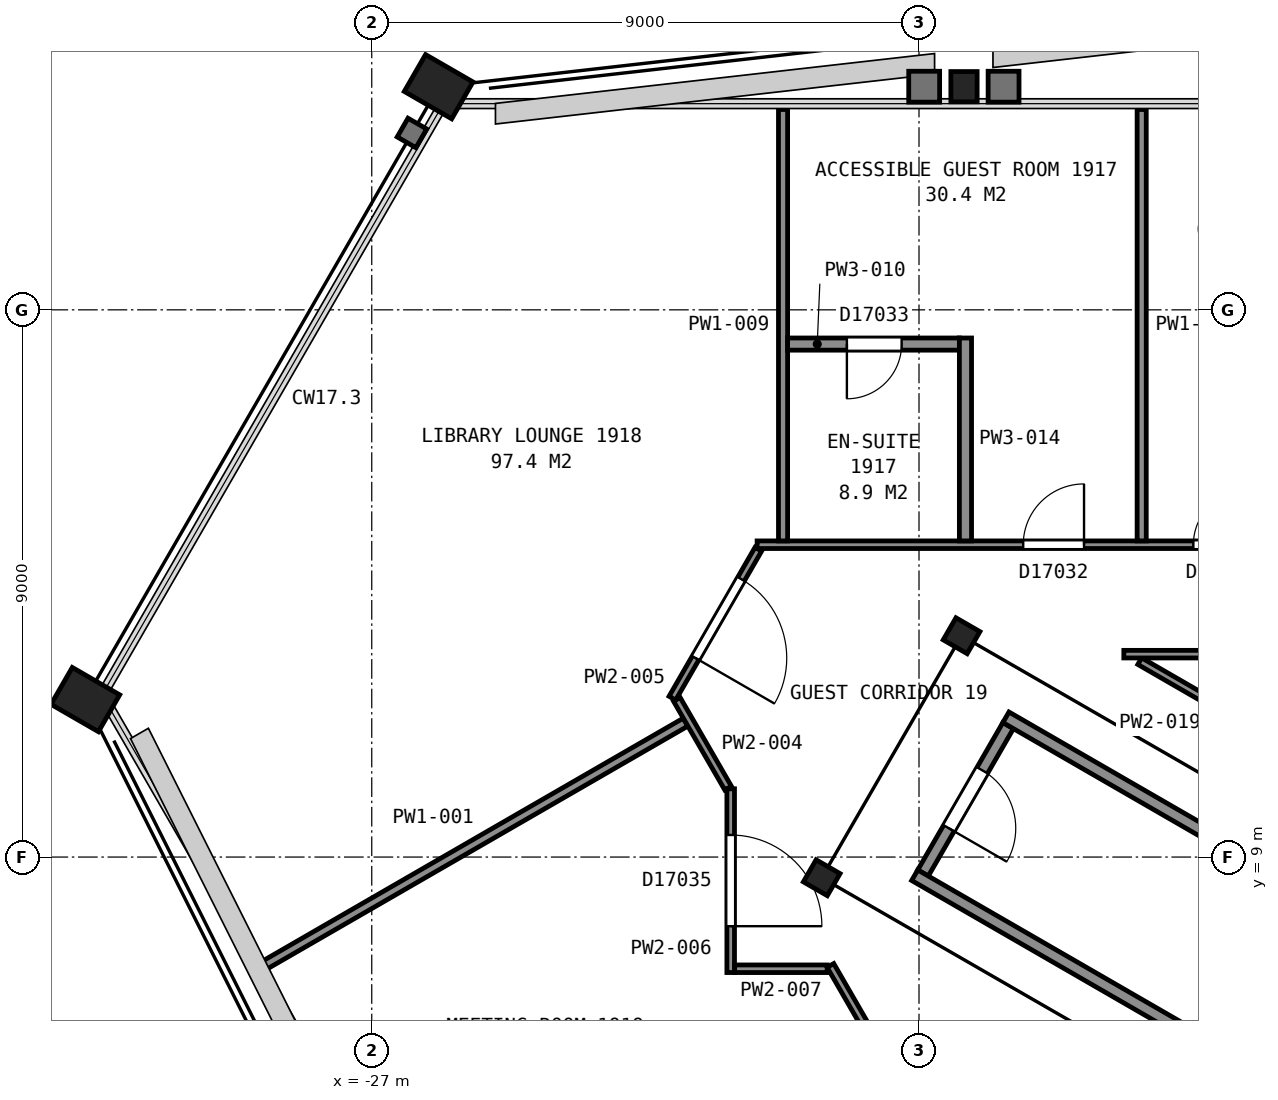
"""IFC4 building model, lengths in metres.
Left out: names, types, materials, properties, quantities, classifications, styles, units other than length and angle.
Written with IfcOpenShell. Run it as: python <this file> out.ifc"""

import sys

from ifc_helpers import new_model, si_unit, direction, frame, frame_2d, origin, origin_2d, place, context, subcontext, project, spatial, rectangle, hollow_rectangle, i_section, extrude, element, fill, save


model = new_model("IFC4")
c1 = context("Model", 3, precision=1e-05, world=origin(), true_north=direction((0.0, 1.0)))
c2 = subcontext(c1, "Body", "Model", "MODEL_VIEW")
j1 = project(units=[si_unit("LENGTHUNIT", "METRE"), si_unit("PLANEANGLEUNIT", "RADIAN")], contexts=[c1])
p1 = place(None, origin())
s1 = spatial("IfcSite", under=j1, at=p1, CompositionType="ELEMENT")
p2 = place(p1, origin())
s2 = spatial("IfcBuilding", under=s1, at=p2, CompositionType="ELEMENT")
p3 = place(p2, frame((0.0, 0.0, 83.6)))
s3 = spatial("IfcBuildingStorey", under=s2, at=p3, CompositionType="ELEMENT", Elevation=83.6)
p4 = place(p3, frame((-17.26, 21.67, 0.0), z_axis=(0.0, 0.0, 1.0), x_axis=(1.0, 0.0, 0.0)))
e1 = element("IfcColumn", 1, at=p4, inside=s3, PredefinedType="COLUMN", context=c2, shape_type="SweptSolid", body=[
    extrude(i_section(OverallWidth=0.432, OverallDepth=0.498, WebThickness=0.056, FlangeThickness=0.089, FilletRadius=0.015, at=origin_2d()), origin(), (0.0, 0.0, 1.0), 2.87),
])
for number, where, z_axis, x_axis in (
    (2, (-25.9, 21.67, 0.0), (0.0, 0.0, 1.0), (0.5, 0.866, 0.0)),
    (3, (-31.71, 11.59, 0.0), (0.0, 0.0, 1.0), (0.5, 0.866, 0.0)),
):
    element("IfcColumn", number, at=place(p3, frame(where, z_axis=z_axis, x_axis=x_axis)), inside=s3, PredefinedType="COLUMN", context=c2, shape_type="SweptSolid", body=[
        extrude(hollow_rectangle(XDim=0.7, YDim=0.9, WallThickness=0.065, at=origin_2d()), origin(), (0.0, 0.0, 1.0), 3.6),
    ])
for number, where, z_axis, x_axis in (
    (4, (-17.3, 12.64, 0.0), (0.0, 0.0, 1.0), (0.5, 0.866, 0.0)),
    (5, (-19.6, 8.66, 0.0), (0.0, 0.0, 1.0), (0.5, 0.866, 0.0)),
):
    element("IfcColumn", number, at=place(p3, frame(where, z_axis=z_axis, x_axis=x_axis)), inside=s3, PredefinedType="COLUMN", context=c2, shape_type="SweptSolid", body=[
        extrude(i_section(OverallWidth=0.419, OverallDepth=0.455, WebThickness=0.042, FlangeThickness=0.068, FilletRadius=0.015, at=origin_2d()), origin(), (0.0, 0.0, 1.0), 3.6),
    ])
p5 = place(p3, frame((-16.534, 11.162, 0.0), z_axis=(0.0, 0.0, 1.0), x_axis=(-0.49998411664, -0.866034573852, 0.0)))
e6 = element("IfcWall", 6, at=p5, inside=s3, PredefinedType="PARTITIONING", context=c2, shape_type="SweptSolid", body=[
    extrude(rectangle(XDim=2.8, YDim=0.2, at=frame_2d((1.4, 0.0))), origin(), (0.0, 0.0, 1.0), 3.35),
])
p6 = place(p5, frame((0.85, 0.0, 0.0)))
e7 = element("IfcOpeningElement", 7, at=p6, cuts=e6, PredefinedType="OPENING", context=c2, shape_type="SweptSolid", body=[
    extrude(rectangle(XDim=1.1, YDim=2.1, at=frame_2d((0.55, 1.05))), frame((0.0, 0.11, 0.0), z_axis=(0.0, -1.0, 0.0), x_axis=(1.0, 0.0, 0.0)), (0.0, 0.0, 1.0), 0.22),
])
for number, where, z_axis, x_axis in (
    (8, (-7.678, 2.701, 0.0), (0.0, 0.0, 1.0), (-0.866, 0.5, 0.0)),
    (9, (-6.178, 5.299, 0.0), (0.0, 0.0, 1.0), (-0.866, 0.5, 0.0)),
):
    element("IfcWall", number, at=place(p3, frame(where, z_axis=z_axis, x_axis=x_axis)), inside=s3, PredefinedType="PARTITIONING", context=c2, shape_type="SweptSolid", body=[
        extrude(rectangle(XDim=12.0, YDim=0.2, at=frame_2d((6.0, 0.0))), origin(), (0.0, 0.0, 1.0), 3.35),
    ])
p7 = place(p3, frame((-28.76, 7.223, 0.0), z_axis=(0.0, 0.0, 1.0), x_axis=(0.866019724796, 0.500009836168, 0.0)))
e10 = element("IfcWall", 10, at=p7, inside=s3, PredefinedType="PARTITIONING", context=c2, shape_type="SweptSolid", body=[
    extrude(rectangle(XDim=7.991, YDim=0.15, at=frame_2d((3.996, 0.0))), origin(), (0.0, 0.0, 1.0), 2.262),
])
p8 = place(p3, frame((-21.982, 11.594, 0.0), z_axis=(0.0, 0.0, 1.0), x_axis=(0.500048373822, -0.865997473344, 0.0)))
e11 = element("IfcWall", 11, at=p8, inside=s3, PredefinedType="PARTITIONING", context=c2, shape_type="SweptSolid", body=[
    extrude(rectangle(XDim=1.686, YDim=0.125, at=frame_2d((0.843, 0.0))), origin(), (0.0, 0.0, 1.0), 2.262),
])
p9 = place(p3, frame((-22.056, 11.613, 0.0), z_axis=(0.0, 0.0, 1.0), x_axis=(0.499647745683, 0.866228682412, 0.0)))
e12 = element("IfcWall", 12, at=p9, inside=s3, PredefinedType="PARTITIONING", context=c2, shape_type="SweptSolid", body=[
    extrude(rectangle(XDim=2.829, YDim=0.125, at=frame_2d((1.415, 0.0))), origin(), (0.0, 0.0, 1.0), 2.262),
])
p10 = place(p9, frame((0.762, 0.0, 0.0)))
e13 = element("IfcOpeningElement", 13, at=p10, cuts=e12, PredefinedType="OPENING", context=c2, shape_type="SweptSolid", body=[
    extrude(rectangle(XDim=1.5, YDim=2.1, at=frame_2d((0.75, 1.05))), frame((0.0, 0.073, 0.0), z_axis=(0.0, -1.0, 0.0), x_axis=(1.0, 0.0, 0.0)), (0.0, 0.0, 1.0), 0.145),
])
p11 = place(p3, frame((-21.097, 7.101, 0.0), z_axis=(0.0, 0.0, 1.0), x_axis=(0.0, 1.0, 0.0)))
e14 = element("IfcWall", 14, at=p11, inside=s3, PredefinedType="PARTITIONING", context=c2, shape_type="SweptSolid", body=[
    extrude(rectangle(XDim=3.022, YDim=0.125, at=frame_2d((1.511, 0.0))), origin(), (0.0, 0.0, 1.0), 2.262),
])
p12 = place(p11, frame((0.762, 0.0, 0.0)))
e15 = element("IfcOpeningElement", 15, at=p12, cuts=e14, PredefinedType="OPENING", context=c2, shape_type="SweptSolid", body=[
    extrude(rectangle(XDim=1.5, YDim=2.1, at=frame_2d((0.75, 1.05))), frame((0.0, 0.073, 0.0), z_axis=(0.0, -1.0, 0.0), x_axis=(1.0, 0.0, 0.0)), (0.0, 0.0, 1.0), 0.145),
])
p13 = place(p3, frame((-21.032, 7.163, 0.0), z_axis=(0.0, 0.0, 1.0), x_axis=(1.0, 0.0, 0.0)))
e16 = element("IfcWall", 16, at=p13, inside=s3, PredefinedType="PARTITIONING", context=c2, shape_type="SweptSolid", body=[
    extrude(rectangle(XDim=1.522, YDim=0.125, at=frame_2d((0.761, 0.0))), origin(), (0.0, 0.0, 1.0), 2.262),
])
p14 = place(p3, frame((-20.663, 14.137, 0.0), z_axis=(0.0, 0.0, 1.0), x_axis=(1.0, 0.0, 0.0)))
e17 = element("IfcWall", 17, at=p14, inside=s3, PredefinedType="PARTITIONING", context=c2, shape_type="SweptSolid", body=[
    extrude(rectangle(XDim=41.325, YDim=0.125, at=frame_2d((20.663, 0.0))), origin(), (0.0, 0.0, 1.0), 2.262),
])
p15 = place(p14, frame((37.071, 0.0, 0.0)))
e18 = element("IfcOpeningElement", 18, at=p15, cuts=e17, PredefinedType="OPENING", context=c2, shape_type="SweptSolid", body=[
    extrude(rectangle(XDim=0.9, YDim=2.1, at=frame_2d((0.45, 1.05))), frame((0.0, 0.073, 0.0), z_axis=(0.0, -1.0, 0.0), x_axis=(1.0, 0.0, 0.0)), (0.0, 0.0, 1.0), 0.145),
])
p16 = place(p14, frame((34.272, 0.0, 0.0)))
e19 = element("IfcOpeningElement", 19, at=p16, cuts=e17, PredefinedType="OPENING", context=c2, shape_type="SweptSolid", body=[
    extrude(rectangle(XDim=1.0, YDim=2.1, at=frame_2d((0.5, 1.05))), frame((0.0, 0.073, 0.0), z_axis=(0.0, -1.0, 0.0), x_axis=(1.0, 0.0, 0.0)), (0.0, 0.0, 1.0), 0.145),
])
p17 = place(p14, frame((26.496, 0.0, 0.0)))
e20 = element("IfcOpeningElement", 20, at=p17, cuts=e17, PredefinedType="OPENING", context=c2, shape_type="SweptSolid", body=[
    extrude(rectangle(XDim=0.9, YDim=2.1, at=frame_2d((0.45, 1.05))), frame((0.0, 0.073, 0.0), z_axis=(0.0, -1.0, 0.0), x_axis=(1.0, 0.0, 0.0)), (0.0, 0.0, 1.0), 0.145),
])
p18 = place(p14, frame((23.917, 0.0, 0.0)))
e21 = element("IfcOpeningElement", 21, at=p18, cuts=e17, PredefinedType="OPENING", context=c2, shape_type="SweptSolid", body=[
    extrude(rectangle(XDim=0.9, YDim=2.1, at=frame_2d((0.45, 1.05))), frame((0.0, 0.073, 0.0), z_axis=(0.0, -1.0, 0.0), x_axis=(1.0, 0.0, 0.0)), (0.0, 0.0, 1.0), 0.145),
])
p19 = place(p14, frame((16.78, 0.0, 0.0)))
e22 = element("IfcOpeningElement", 22, at=p19, cuts=e17, PredefinedType="OPENING", context=c2, shape_type="SweptSolid", body=[
    extrude(rectangle(XDim=0.9, YDim=2.1, at=frame_2d((0.45, 1.05))), frame((0.0, 0.073, 0.0), z_axis=(0.0, -1.0, 0.0), x_axis=(1.0, 0.0, 0.0)), (0.0, 0.0, 1.0), 0.145),
])
p20 = place(p14, frame((13.952, 0.0, 0.0)))
e23 = element("IfcOpeningElement", 23, at=p20, cuts=e17, PredefinedType="OPENING", context=c2, shape_type="SweptSolid", body=[
    extrude(rectangle(XDim=0.9, YDim=2.1, at=frame_2d((0.45, 1.05))), frame((0.0, 0.073, 0.0), z_axis=(0.0, -1.0, 0.0), x_axis=(1.0, 0.0, 0.0)), (0.0, 0.0, 1.0), 0.145),
])
p21 = place(p14, frame((7.175, 0.0, 0.0)))
e24 = element("IfcOpeningElement", 24, at=p21, cuts=e17, PredefinedType="OPENING", context=c2, shape_type="SweptSolid", body=[
    extrude(rectangle(XDim=0.9, YDim=2.1, at=frame_2d((0.45, 1.05))), frame((0.0, 0.073, 0.0), z_axis=(0.0, -1.0, 0.0), x_axis=(1.0, 0.0, 0.0)), (0.0, 0.0, 1.0), 0.145),
])
p22 = place(p14, frame((4.376, 0.0, 0.0)))
e25 = element("IfcOpeningElement", 25, at=p22, cuts=e17, PredefinedType="OPENING", context=c2, shape_type="SweptSolid", body=[
    extrude(rectangle(XDim=1.0, YDim=2.1, at=frame_2d((0.5, 1.05))), frame((0.0, 0.073, 0.0), z_axis=(0.0, -1.0, 0.0), x_axis=(1.0, 0.0, 0.0)), (0.0, 0.0, 1.0), 0.145),
])
p23 = place(p3, frame((-20.236, 14.199, 0.0), z_axis=(0.0, 0.0, 1.0), x_axis=(0.0, 1.0, 0.0)))
e26 = element("IfcWall", 26, at=p23, inside=s3, PredefinedType="PARTITIONING", context=c2, shape_type="SweptSolid", body=[
    extrude(rectangle(XDim=7.095, YDim=0.15, at=frame_2d((3.548, 0.0))), origin(), (0.0, 0.0, 1.0), 2.262),
])
p24 = place(p3, frame((-17.336, 17.437, 0.0), z_axis=(0.0, 0.0, 1.0), x_axis=(-1.0, 0.0, 0.0)))
e27 = element("IfcWall", 27, at=p24, inside=s3, PredefinedType="PARTITIONING", context=c2, shape_type="SweptSolid", body=[
    extrude(rectangle(XDim=2.825, YDim=0.2, at=frame_2d((1.413, 0.0))), origin(), (0.0, 0.0, 1.0), 2.262),
])
p25 = place(p24, frame((0.95, 0.0, 0.0)))
e28 = element("IfcOpeningElement", 28, at=p25, cuts=e27, PredefinedType="OPENING", context=c2, shape_type="SweptSolid", body=[
    extrude(rectangle(XDim=0.9, YDim=2.1, at=frame_2d((0.45, 1.05))), frame((0.0, 0.11, 0.0), z_axis=(0.0, -1.0, 0.0), x_axis=(1.0, 0.0, 0.0)), (0.0, 0.0, 1.0), 0.22),
])
p26 = place(p3, frame((-3.766, -19.958, 0.0), z_axis=(0.0, 0.0, 1.0), x_axis=(-0.50002170027, 0.866012874765, 0.0)))
e29 = element("IfcWall", 29, at=p26, inside=s3, PredefinedType="PARTITIONING", context=c2, shape_type="SweptSolid", body=[
    extrude(rectangle(XDim=31.379, YDim=0.125, at=frame_2d((15.69, 0.0))), origin(), (0.0, 0.0, 1.0), 2.262),
])
p27 = place(p26, frame((25.28, 0.0, 0.0)))
e30 = element("IfcOpeningElement", 30, at=p27, cuts=e29, PredefinedType="OPENING", context=c2, shape_type="SweptSolid", body=[
    extrude(rectangle(XDim=1.5, YDim=2.1, at=frame_2d((0.75, 1.05))), frame((0.0, 0.073, 0.0), z_axis=(0.0, -1.0, 0.0), x_axis=(1.0, 0.0, 0.0)), (0.0, 0.0, 1.0), 0.145),
])
p28 = place(p26, frame((21.124, 0.0, 0.0)))
e31 = element("IfcOpeningElement", 31, at=p28, cuts=e29, PredefinedType="OPENING", context=c2, shape_type="SweptSolid", body=[
    extrude(rectangle(XDim=0.9, YDim=2.1, at=frame_2d((0.45, 1.05))), frame((0.0, 0.073, 0.0), z_axis=(0.0, -1.0, 0.0), x_axis=(1.0, 0.0, 0.0)), (0.0, 0.0, 1.0), 0.145),
])
p29 = place(p26, frame((14.349, 0.0, 0.0)))
e32 = element("IfcOpeningElement", 32, at=p29, cuts=e29, PredefinedType="OPENING", context=c2, shape_type="SweptSolid", body=[
    extrude(rectangle(XDim=0.9, YDim=2.1, at=frame_2d((0.45, 1.05))), frame((0.0, 0.073, 0.0), z_axis=(0.0, -1.0, 0.0), x_axis=(1.0, 0.0, 0.0)), (0.0, 0.0, 1.0), 0.145),
])
p30 = place(p26, frame((11.804, 0.0, 0.0)))
e33 = element("IfcOpeningElement", 33, at=p30, cuts=e29, PredefinedType="OPENING", context=c2, shape_type="SweptSolid", body=[
    extrude(rectangle(XDim=0.9, YDim=2.1, at=frame_2d((0.45, 1.05))), frame((0.0, 0.073, 0.0), z_axis=(0.0, -1.0, 0.0), x_axis=(1.0, 0.0, 0.0)), (0.0, 0.0, 1.0), 0.145),
])
p31 = place(p26, frame((5.33, 0.0, 0.0)))
e34 = element("IfcOpeningElement", 34, at=p31, cuts=e29, PredefinedType="OPENING", context=c2, shape_type="SweptSolid", body=[
    extrude(rectangle(XDim=0.9, YDim=2.1, at=frame_2d((0.45, 1.05))), frame((0.0, 0.073, 0.0), z_axis=(0.0, -1.0, 0.0), x_axis=(1.0, 0.0, 0.0)), (0.0, 0.0, 1.0), 0.145),
])
p32 = place(p26, frame((2.906, 0.0, 0.0)))
e35 = element("IfcOpeningElement", 35, at=p32, cuts=e29, PredefinedType="OPENING", context=c2, shape_type="SweptSolid", body=[
    extrude(rectangle(XDim=1.0, YDim=2.1, at=frame_2d((0.5, 1.05))), frame((0.0, 0.073, 0.0), z_axis=(0.0, -1.0, 0.0), x_axis=(1.0, 0.0, 0.0)), (0.0, 0.0, 1.0), 0.145),
])
p33 = place(p3, frame((-17.236, 14.199, 0.0), z_axis=(0.0, 0.0, 1.0), x_axis=(0.0, 1.0, 0.0)))
e36 = element("IfcWall", 36, at=p33, inside=s3, PredefinedType="PARTITIONING", context=c2, shape_type="SweptSolid", body=[
    extrude(rectangle(XDim=3.338, YDim=0.2, at=frame_2d((1.669, 0.0))), origin(), (0.0, 0.0, 1.0), 2.262),
])
p34 = place(p3, frame((-14.37, 12.222, 0.0), z_axis=(0.0, 0.0, 1.0), x_axis=(0.866063239147, -0.499934461503, 0.0)))
e37 = element("IfcWall", 37, at=p34, inside=s3, PredefinedType="PARTITIONING", context=c2, shape_type="SweptSolid", body=[
    extrude(rectangle(XDim=2.359, YDim=0.125, at=frame_2d((1.18, 0.0))), origin(), (0.0, 0.0, 1.0), 2.262),
])
p35 = place(p3, frame((-14.632, 12.337, 0.0), z_axis=(0.0, 0.0, 1.0), x_axis=(1.0, 0.0, 0.0)))
e38 = element("IfcWall", 38, at=p35, inside=s3, PredefinedType="PARTITIONING", context=c2, shape_type="SweptSolid", body=[
    extrude(rectangle(XDim=29.263, YDim=0.125, at=frame_2d((14.632, 0.0))), origin(), (0.0, 0.0, 1.0), 2.262),
])
p36 = place(p3, frame((-14.338, 14.199, 0.0), z_axis=(0.0, 0.0, 1.0), x_axis=(0.0, 1.0, 0.0)))
e39 = element("IfcWall", 39, at=p36, inside=s3, PredefinedType="PARTITIONING", context=c2, shape_type="SweptSolid", body=[
    extrude(rectangle(XDim=7.095, YDim=0.15, at=frame_2d((3.548, 0.0))), origin(), (0.0, 0.0, 1.0), 2.262),
])
p37 = place(p6, origin())
e40 = element("IfcDoor", 40, at=p37, inside=s3, OperationType="SINGLE_SWING_RIGHT", PredefinedType="DOOR", context=c2, shape_type="SweptSolid", body=[
    extrude(rectangle(XDim=1.1, YDim=2.1, at=frame_2d((0.55, 1.05))), frame((0.0, 0.025, 0.0), z_axis=(0.0, -1.0, 0.0), x_axis=(1.0, 0.0, 0.0)), (0.0, 0.0, 1.0), 0.05),
])
fill(e7, e40)
p38 = place(p10, origin())
e41 = element("IfcDoor", 41, at=p38, inside=s3, OperationType="DOUBLE_DOOR_SINGLE_SWING", PredefinedType="DOOR", context=c2, shape_type="SweptSolid", body=[
    extrude(rectangle(XDim=1.5, YDim=2.1, at=frame_2d((0.75, 1.05))), frame((0.0, 0.025, 0.0), z_axis=(0.0, -1.0, 0.0), x_axis=(1.0, 0.0, 0.0)), (0.0, 0.0, 1.0), 0.05),
])
fill(e13, e41)
p39 = place(p12, origin())
e42 = element("IfcDoor", 42, at=p39, inside=s3, OperationType="DOUBLE_DOOR_SINGLE_SWING", PredefinedType="DOOR", context=c2, shape_type="SweptSolid", body=[
    extrude(rectangle(XDim=1.5, YDim=2.1, at=frame_2d((0.75, 1.05))), frame((0.0, 0.025, 0.0), z_axis=(0.0, -1.0, 0.0), x_axis=(1.0, 0.0, 0.0)), (0.0, 0.0, 1.0), 0.05),
])
fill(e15, e42)
p40 = place(p21, origin())
e43 = element("IfcDoor", 43, at=p40, inside=s3, OperationType="SINGLE_SWING_RIGHT", PredefinedType="DOOR", context=c2, shape_type="SweptSolid", body=[
    extrude(rectangle(XDim=0.9, YDim=2.1, at=frame_2d((0.45, 1.05))), frame((0.0, 0.025, 0.0), z_axis=(0.0, -1.0, 0.0), x_axis=(1.0, 0.0, 0.0)), (0.0, 0.0, 1.0), 0.05),
])
fill(e24, e43)
p41 = place(p22, origin())
e44 = element("IfcDoor", 44, at=p41, inside=s3, OperationType="SINGLE_SWING_RIGHT", PredefinedType="DOOR", context=c2, shape_type="SweptSolid", body=[
    extrude(rectangle(XDim=1.0, YDim=2.1, at=frame_2d((0.5, 1.05))), frame((0.0, 0.025, 0.0), z_axis=(0.0, -1.0, 0.0), x_axis=(1.0, 0.0, 0.0)), (0.0, 0.0, 1.0), 0.05),
])
fill(e25, e44)
p42 = place(p25, origin())
e45 = element("IfcDoor", 45, at=p42, inside=s3, OperationType="SINGLE_SWING_RIGHT", PredefinedType="DOOR", context=c2, shape_type="SweptSolid", body=[
    extrude(rectangle(XDim=0.9, YDim=2.1, at=frame_2d((0.45, 1.05))), frame((0.0, 0.025, 0.0), z_axis=(0.0, -1.0, 0.0), x_axis=(1.0, 0.0, 0.0)), (0.0, 0.0, 1.0), 0.05),
])
fill(e28, e45)
save(model, sys.argv[1])
